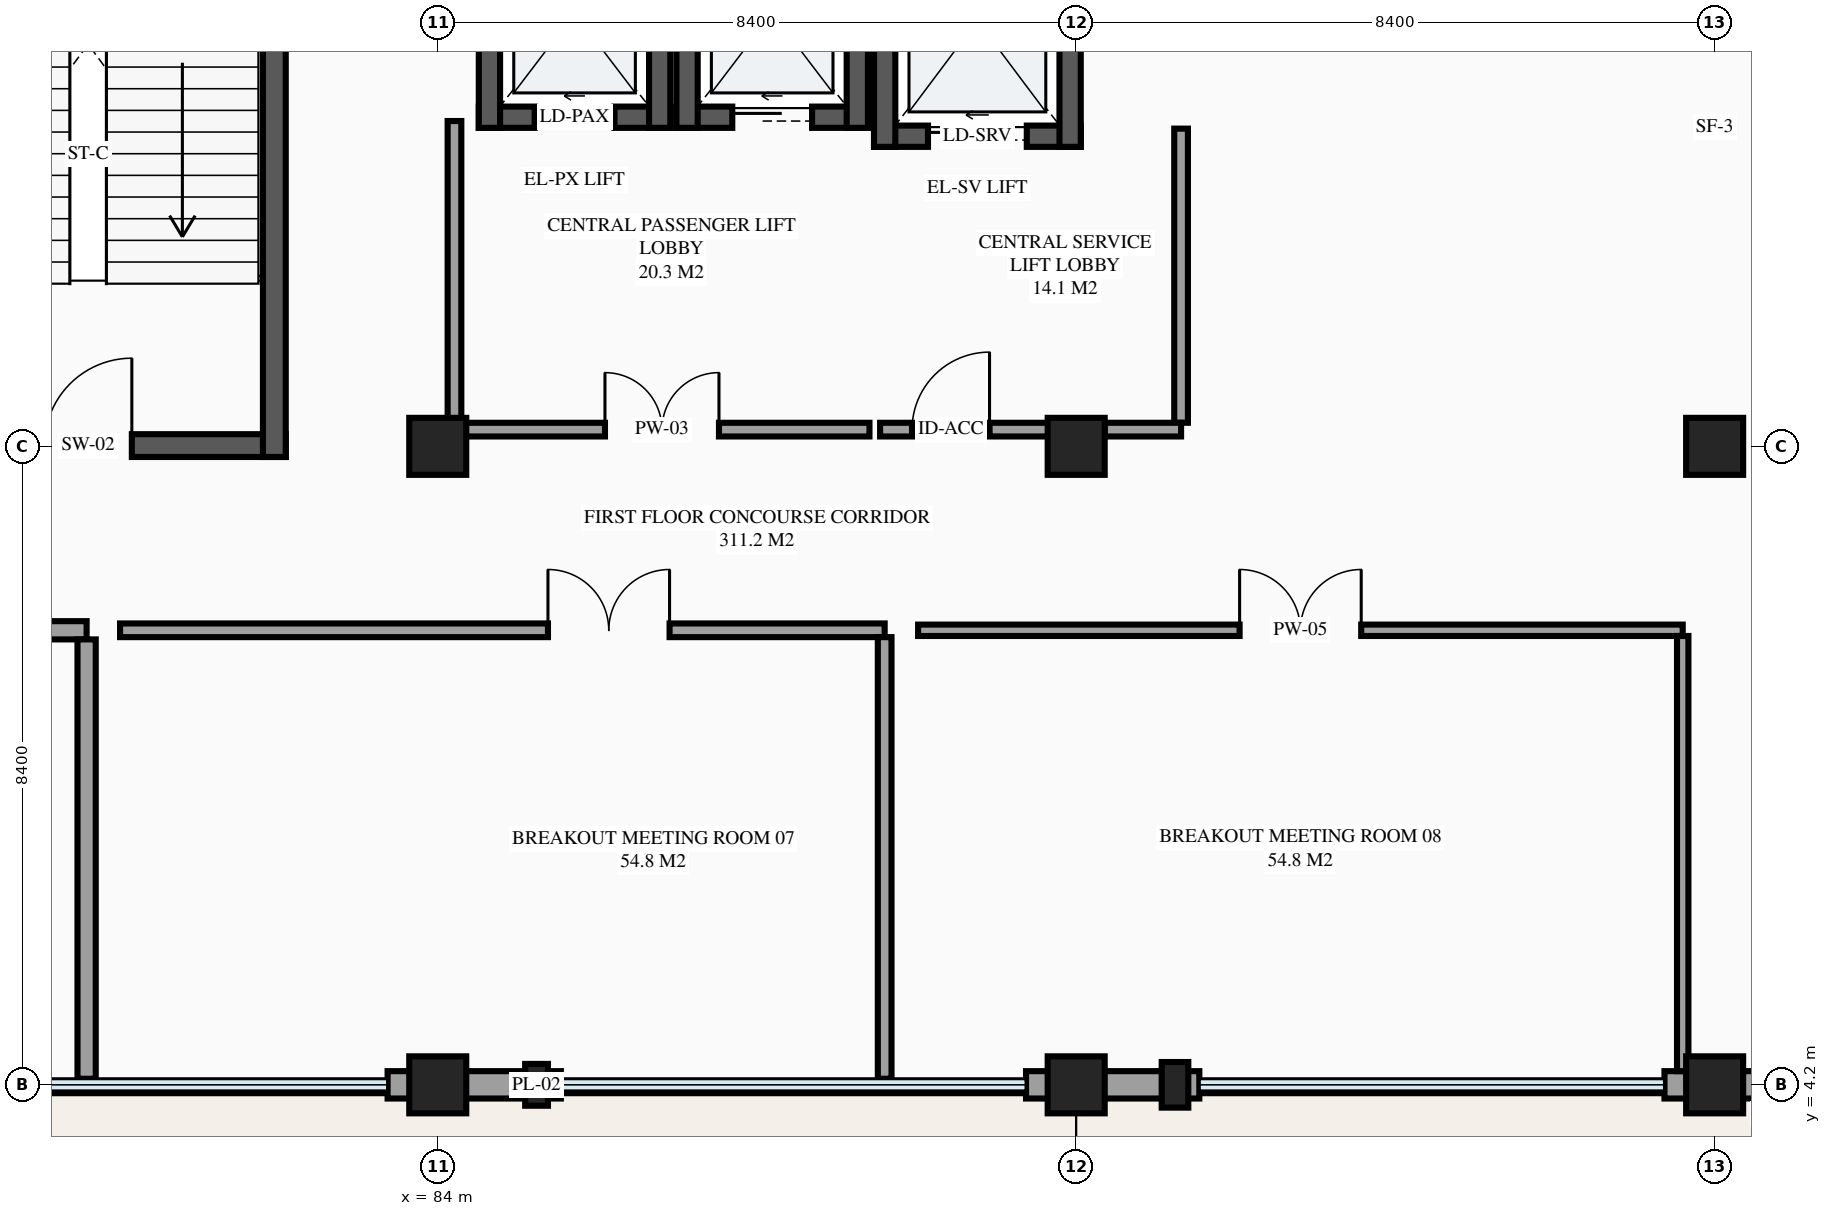
"""IFC4 building model, lengths in metres.
Left out: names, types, materials, properties, quantities, classifications, styles, units other than length and angle.
Written with IfcOpenShell. Run it as: python <this file> out.ifc"""

import sys

from ifc_helpers import new_model, si_unit, direction, frame, frame_2d, origin, origin_2d, place, context, subcontext, project, spatial, rectangle, extrude, element, fill, save


model = new_model("IFC4")
c1 = context("Model", 3, precision=1e-05, world=origin(), true_north=direction((0.0, 1.0)))
c2 = subcontext(c1, "Body", "Model", "MODEL_VIEW")
j1 = project(units=[si_unit("LENGTHUNIT", "METRE"), si_unit("PLANEANGLEUNIT", "RADIAN")], contexts=[c1])
p1 = place(None, origin())
s1 = spatial("IfcSite", under=j1, at=p1, CompositionType="ELEMENT")
p2 = place(p1, origin())
s2 = spatial("IfcBuilding", under=s1, at=p2, CompositionType="ELEMENT")
p3 = place(p2, frame((0.0, 0.0, 5.4)))
s3 = spatial("IfcBuildingStorey", under=s2, at=p3, CompositionType="ELEMENT", Elevation=5.4)
for number, where, z_axis, x_axis in (
    (1, (84.0, 4.2, 0.0), (0.0, 0.0, 1.0), (1.0, 0.0, 0.0)),
    (2, (84.0, 12.6, 0.0), (0.0, 0.0, 1.0), (1.0, 0.0, 0.0)),
    (3, (92.4, 4.2, 0.0), (0.0, 0.0, 1.0), (1.0, 0.0, 0.0)),
    (4, (92.4, 12.6, 0.0), (0.0, 0.0, 1.0), (1.0, 0.0, 0.0)),
    (5, (100.8, 4.2, 0.0), (0.0, 0.0, 1.0), (1.0, 0.0, 0.0)),
    (6, (100.8, 12.6, 0.0), (0.0, 0.0, 1.0), (1.0, 0.0, 0.0)),
):
    element("IfcColumn", number, at=place(p3, frame(where, z_axis=z_axis, x_axis=x_axis)), inside=s3, PredefinedType="COLUMN", context=c2, shape_type="SweptSolid", body=[
        extrude(rectangle(XDim=0.75, YDim=0.75, at=origin_2d()), origin(), (0.0, 0.0, 1.0), 4.5),
    ])
p4 = place(p3, frame((85.3, 4.2, 0.0), z_axis=(0.0, 0.0, 1.0), x_axis=(1.0, 0.0, 0.0)))
e7 = element("IfcColumn", 7, at=p4, inside=s3, PredefinedType="PILASTER", context=c2, shape_type="SweptSolid", body=[
    extrude(rectangle(XDim=0.3, YDim=0.55, at=origin_2d()), origin(), (0.0, 0.0, 1.0), 4.5),
])
p5 = place(p3, frame((93.7, 4.2, 0.0), z_axis=(0.0, 0.0, 1.0), x_axis=(1.0, 0.0, 0.0)))
e8 = element("IfcColumn", 8, at=p5, inside=s3, PredefinedType="PILASTER", context=c2, shape_type="SweptSolid", body=[
    extrude(rectangle(XDim=0.35, YDim=0.6, at=origin_2d()), origin(), (0.0, 0.0, 1.0), 4.5),
])
p6 = place(p3, frame((83.34, 4.2, 0.0), z_axis=(0.0, 0.0, 1.0), x_axis=(1.0, 0.0, 0.0)))
e9 = element("IfcWall", 9, at=p6, inside=s3, PredefinedType="STANDARD", context=c2, shape_type="SweptSolid", body=[
    extrude(rectangle(XDim=0.66, YDim=0.36, at=frame_2d((0.33, 0.0))), origin(), (0.0, 0.0, 1.0), 4.5),
])
p7 = place(p3, frame((84.0, 4.2, 0.0), z_axis=(0.0, 0.0, 1.0), x_axis=(1.0, 0.0, 0.0)))
e10 = element("IfcWall", 10, at=p7, inside=s3, PredefinedType="STANDARD", context=c2, shape_type="SweptSolid", body=[
    extrude(rectangle(XDim=1.62, YDim=0.36, at=frame_2d((0.81, 0.0))), origin(), (0.0, 0.0, 1.0), 3.93),
])
p8 = place(p3, frame((91.74, 4.2, 0.0), z_axis=(0.0, 0.0, 1.0), x_axis=(1.0, 0.0, 0.0)))
e11 = element("IfcWall", 11, at=p8, inside=s3, PredefinedType="STANDARD", context=c2, shape_type="SweptSolid", body=[
    extrude(rectangle(XDim=0.66, YDim=0.36, at=frame_2d((0.33, 0.0))), origin(), (0.0, 0.0, 1.0), 4.5),
])
p9 = place(p3, frame((92.4, 4.2, 0.0), z_axis=(0.0, 0.0, 1.0), x_axis=(1.0, 0.0, 0.0)))
e12 = element("IfcWall", 12, at=p9, inside=s3, PredefinedType="STANDARD", context=c2, shape_type="SweptSolid", body=[
    extrude(rectangle(XDim=1.62, YDim=0.36, at=frame_2d((0.81, 0.0))), origin(), (0.0, 0.0, 1.0), 3.83),
])
p10 = place(p3, frame((100.14, 4.2, 0.0), z_axis=(0.0, 0.0, 1.0), x_axis=(1.0, 0.0, 0.0)))
e13 = element("IfcWall", 13, at=p10, inside=s3, PredefinedType="STANDARD", context=c2, shape_type="SweptSolid", body=[
    extrude(rectangle(XDim=0.66, YDim=0.36, at=frame_2d((0.33, 0.0))), origin(), (0.0, 0.0, 1.0), 4.5),
])
p11 = place(p3, frame((100.8, 4.2, 0.0), z_axis=(0.0, 0.0, 1.0), x_axis=(1.0, 0.0, 0.0)))
e14 = element("IfcWall", 14, at=p11, inside=s3, PredefinedType="STANDARD", context=c2, shape_type="SweptSolid", body=[
    extrude(rectangle(XDim=8.4, YDim=0.36, at=frame_2d((4.2, 0.0))), origin(), (0.0, 0.0, 1.0), 3.44),
])
p12 = place(p11, frame((3.0, 0.0, 0.75)))
e15 = element("IfcOpeningElement", 15, at=p12, cuts=e14, PredefinedType="OPENING", context=c2, shape_type="SweptSolid", body=[
    extrude(rectangle(XDim=2.4, YDim=1.5, at=frame_2d((1.2, 0.75))), frame((0.0, 0.19, 0.0), z_axis=(0.0, -1.0, 0.0), x_axis=(1.0, 0.0, 0.0)), (0.0, 0.0, 1.0), 0.38),
])
p13 = place(p3, frame((84.54, 16.93, 0.0), z_axis=(0.0, 0.0, 1.0), x_axis=(1.0, 0.0, 0.0)))
e16 = element("IfcWall", 16, at=p13, inside=s3, PredefinedType="SHEAR", context=c2, shape_type="SweptSolid", body=[
    extrude(rectangle(XDim=2.52, YDim=0.28, at=frame_2d((1.26, 0.0))), origin(), (0.0, 0.0, 1.0), 4.5),
])
p14 = place(p13, frame((0.735, 0.0, 0.0)))
e17 = element("IfcOpeningElement", 17, at=p14, cuts=e16, PredefinedType="OPENING", context=c2, shape_type="SweptSolid", body=[
    extrude(rectangle(XDim=1.05, YDim=2.2, at=frame_2d((0.525, 1.1))), frame((0.0, 0.15, 0.0), z_axis=(0.0, -1.0, 0.0), x_axis=(1.0, 0.0, 0.0)), (0.0, 0.0, 1.0), 0.3),
])
for number, where, z_axis, x_axis in (
    (18, (86.92, 16.79, 0.0), (0.0, 0.0, 1.0), (0.0, 1.0, 0.0)),
    (19, (84.68, 19.81, 0.0), (0.0, 0.0, 1.0), (0.0, -1.0, 0.0)),
):
    element("IfcWall", number, at=place(p3, frame(where, z_axis=z_axis, x_axis=x_axis)), inside=s3, PredefinedType="SHEAR", context=c2, shape_type="SweptSolid", body=[
        extrude(rectangle(XDim=3.02, YDim=0.28, at=frame_2d((1.51, 0.0))), origin(), (0.0, 0.0, 1.0), 4.5),
    ])
p15 = place(p3, frame((87.14, 16.93, 0.0), z_axis=(0.0, 0.0, 1.0), x_axis=(1.0, 0.0, 0.0)))
e20 = element("IfcWall", 20, at=p15, inside=s3, PredefinedType="SHEAR", context=c2, shape_type="SweptSolid", body=[
    extrude(rectangle(XDim=2.52, YDim=0.28, at=frame_2d((1.26, 0.0))), origin(), (0.0, 0.0, 1.0), 4.5),
])
p16 = place(p15, frame((0.735, 0.0, 0.0)))
e21 = element("IfcOpeningElement", 21, at=p16, cuts=e20, PredefinedType="OPENING", context=c2, shape_type="SweptSolid", body=[
    extrude(rectangle(XDim=1.05, YDim=2.2, at=frame_2d((0.525, 1.1))), frame((0.0, 0.15, 0.0), z_axis=(0.0, -1.0, 0.0), x_axis=(1.0, 0.0, 0.0)), (0.0, 0.0, 1.0), 0.3),
])
for number, where, z_axis, x_axis in (
    (22, (89.52, 16.79, 0.0), (0.0, 0.0, 1.0), (0.0, 1.0, 0.0)),
    (23, (87.28, 19.81, 0.0), (0.0, 0.0, 1.0), (0.0, -1.0, 0.0)),
):
    element("IfcWall", number, at=place(p3, frame(where, z_axis=z_axis, x_axis=x_axis)), inside=s3, PredefinedType="SHEAR", context=c2, shape_type="SweptSolid", body=[
        extrude(rectangle(XDim=3.02, YDim=0.28, at=frame_2d((1.51, 0.0))), origin(), (0.0, 0.0, 1.0), 4.5),
    ])
p17 = place(p3, frame((89.74, 16.68, 0.0), z_axis=(0.0, 0.0, 1.0), x_axis=(1.0, 0.0, 0.0)))
e24 = element("IfcWall", 24, at=p17, inside=s3, PredefinedType="SHEAR", context=c2, shape_type="SweptSolid", body=[
    extrude(rectangle(XDim=2.72, YDim=0.28, at=frame_2d((1.36, 0.0))), origin(), (0.0, 0.0, 1.0), 4.5),
])
p18 = place(p17, frame((0.71, 0.0, 0.0)))
e25 = element("IfcOpeningElement", 25, at=p18, cuts=e24, PredefinedType="OPENING", context=c2, shape_type="SweptSolid", body=[
    extrude(rectangle(XDim=1.3, YDim=2.25, at=frame_2d((0.65, 1.125))), frame((0.0, 0.15, 0.0), z_axis=(0.0, -1.0, 0.0), x_axis=(1.0, 0.0, 0.0)), (0.0, 0.0, 1.0), 0.3),
])
for number, where, z_axis, x_axis in (
    (26, (92.32, 16.54, 0.0), (0.0, 0.0, 1.0), (0.0, 1.0, 0.0)),
    (27, (89.88, 19.86, 0.0), (0.0, 0.0, 1.0), (0.0, -1.0, 0.0)),
):
    element("IfcWall", number, at=place(p3, frame(where, z_axis=z_axis, x_axis=x_axis)), inside=s3, PredefinedType="SHEAR", context=c2, shape_type="SweptSolid", body=[
        extrude(rectangle(XDim=3.32, YDim=0.28, at=frame_2d((1.66, 0.0))), origin(), (0.0, 0.0, 1.0), 4.5),
    ])
p19 = place(p3, frame((76.8, 12.61, 0.0), z_axis=(0.0, 0.0, 1.0), x_axis=(1.0, 0.0, 0.0)))
e28 = element("IfcWall", 28, at=p19, inside=s3, PredefinedType="SHEAR", context=c2, shape_type="SweptSolid", body=[
    extrude(rectangle(XDim=5.2, YDim=0.3, at=frame_2d((2.6, 0.0))), origin(), (0.0, 0.0, 1.0), 4.5),
])
p20 = place(p19, frame((2.025, 0.0, 0.0)))
e29 = element("IfcOpeningElement", 29, at=p20, cuts=e28, PredefinedType="OPENING", context=c2, shape_type="SweptSolid", body=[
    extrude(rectangle(XDim=1.15, YDim=2.15, at=frame_2d((0.575, 1.075))), frame((0.0, 0.16, 0.0), z_axis=(0.0, -1.0, 0.0), x_axis=(1.0, 0.0, 0.0)), (0.0, 0.0, 1.0), 0.32),
])
p21 = place(p3, frame((81.85, 12.46, 0.0), z_axis=(0.0, 0.0, 1.0), x_axis=(0.0, 1.0, 0.0)))
e30 = element("IfcWall", 30, at=p21, inside=s3, PredefinedType="SHEAR", context=c2, shape_type="SweptSolid", body=[
    extrude(rectangle(XDim=8.84, YDim=0.3, at=frame_2d((4.42, 0.0))), origin(), (0.0, 0.0, 1.0), 4.5),
])
p22 = place(p3, frame((84.22, 12.82, 0.0), z_axis=(0.0, 0.0, 1.0), x_axis=(1.0, 0.0, 0.0)))
e31 = element("IfcWall", 31, at=p22, inside=s3, PredefinedType="PARTITIONING", context=c2, shape_type="SweptSolid", body=[
    extrude(rectangle(XDim=5.46, YDim=0.18, at=frame_2d((2.73, 0.0))), origin(), (0.0, 0.0, 1.0), 4.235),
])
p23 = place(p22, frame((1.98, 0.0, 0.0)))
e32 = element("IfcOpeningElement", 32, at=p23, cuts=e31, PredefinedType="OPENING", context=c2, shape_type="SweptSolid", body=[
    extrude(rectangle(XDim=1.5, YDim=2.15, at=frame_2d((0.75, 1.075))), frame((0.0, 0.1, 0.0), z_axis=(0.0, -1.0, 0.0), x_axis=(1.0, 0.0, 0.0)), (0.0, 0.0, 1.0), 0.2),
])
p24 = place(p3, frame((84.22, 12.91, 0.0), z_axis=(0.0, 0.0, 1.0), x_axis=(0.0, 1.0, 0.0)))
e33 = element("IfcWall", 33, at=p24, inside=s3, PredefinedType="PARTITIONING", context=c2, shape_type="SweptSolid", body=[
    extrude(rectangle(XDim=3.97, YDim=0.18, at=frame_2d((1.985, 0.0))), origin(), (0.0, 0.0, 1.0), 4.235),
])
p25 = place(p3, frame((89.82, 12.82, 0.0), z_axis=(0.0, 0.0, 1.0), x_axis=(1.0, 0.0, 0.0)))
e34 = element("IfcWall", 34, at=p25, inside=s3, PredefinedType="PARTITIONING", context=c2, shape_type="SweptSolid", body=[
    extrude(rectangle(XDim=2.955, YDim=0.18, at=frame_2d((1.478, 0.0))), origin(), (0.0, 0.0, 1.0), 4.235),
])
p26 = place(p25, frame((0.42, 0.0, 0.0)))
e35 = element("IfcOpeningElement", 35, at=p26, cuts=e34, PredefinedType="OPENING", context=c2, shape_type="SweptSolid", body=[
    extrude(rectangle(XDim=1.02, YDim=2.15, at=frame_2d((0.51, 1.075))), frame((0.0, 0.1, 0.0), z_axis=(0.0, -1.0, 0.0), x_axis=(1.0, 0.0, 0.0)), (0.0, 0.0, 1.0), 0.2),
])
p27 = place(p3, frame((93.78, 12.91, 0.0), z_axis=(0.0, 0.0, 1.0), x_axis=(0.0, 1.0, 0.0)))
e36 = element("IfcWall", 36, at=p27, inside=s3, PredefinedType="PARTITIONING", context=c2, shape_type="SweptSolid", body=[
    extrude(rectangle(XDim=3.87, YDim=0.18, at=frame_2d((1.935, 0.0))), origin(), (0.0, 0.0, 1.0), 4.235),
])
p28 = place(p3, frame((69.32, 10.18, 0.0), z_axis=(0.0, 0.0, 1.0), x_axis=(1.0, 0.0, 0.0)))
e37 = element("IfcWall", 37, at=p28, inside=s3, PredefinedType="PARTITIONING", context=c2, shape_type="SweptSolid", body=[
    extrude(rectangle(XDim=10.06, YDim=0.24, at=frame_2d((5.03, 0.0))), origin(), (0.0, 0.0, 1.0), 4.235),
])
p29 = place(p28, frame((3.18, 0.0, 0.0)))
e38 = element("IfcOpeningElement", 38, at=p29, cuts=e37, PredefinedType="OPENING", context=c2, shape_type="SweptSolid", body=[
    extrude(rectangle(XDim=1.6, YDim=2.25, at=frame_2d((0.8, 1.125))), frame((0.0, 0.13, 0.0), z_axis=(0.0, -1.0, 0.0), x_axis=(1.0, 0.0, 0.0)), (0.0, 0.0, 1.0), 0.26),
])
p30 = place(p3, frame((79.38, 4.28, 0.0), z_axis=(0.0, 0.0, 1.0), x_axis=(0.0, 1.0, 0.0)))
e39 = element("IfcWall", 39, at=p30, inside=s3, PredefinedType="PARTITIONING", context=c2, shape_type="SweptSolid", body=[
    extrude(rectangle(XDim=5.78, YDim=0.24, at=frame_2d((2.89, 0.0))), origin(), (0.0, 0.0, 1.0), 4.235),
])
p31 = place(p3, frame((79.82, 10.18, 0.0), z_axis=(0.0, 0.0, 1.0), x_axis=(1.0, 0.0, 0.0)))
e40 = element("IfcWall", 40, at=p31, inside=s3, PredefinedType="PARTITIONING", context=c2, shape_type="SweptSolid", body=[
    extrude(rectangle(XDim=10.06, YDim=0.18, at=frame_2d((5.03, 0.0))), origin(), (0.0, 0.0, 1.0), 4.235),
])
p32 = place(p31, frame((5.63, 0.0, 0.0)))
e41 = element("IfcOpeningElement", 41, at=p32, cuts=e40, PredefinedType="OPENING", context=c2, shape_type="SweptSolid", body=[
    extrude(rectangle(XDim=1.6, YDim=2.25, at=frame_2d((0.8, 1.125))), frame((0.0, 0.1, 0.0), z_axis=(0.0, -1.0, 0.0), x_axis=(1.0, 0.0, 0.0)), (0.0, 0.0, 1.0), 0.2),
])
p33 = place(p3, frame((89.88, 4.28, 0.0), z_axis=(0.0, 0.0, 1.0), x_axis=(0.0, 1.0, 0.0)))
e42 = element("IfcWall", 42, at=p33, inside=s3, PredefinedType="PARTITIONING", context=c2, shape_type="SweptSolid", body=[
    extrude(rectangle(XDim=5.81, YDim=0.18, at=frame_2d((2.905, 0.0))), origin(), (0.0, 0.0, 1.0), 4.235),
])
p34 = place(p3, frame((90.32, 10.18, 0.0), z_axis=(0.0, 0.0, 1.0), x_axis=(1.0, 0.0, 0.0)))
e43 = element("IfcWall", 43, at=p34, inside=s3, PredefinedType="PARTITIONING", context=c2, shape_type="SweptSolid", body=[
    extrude(rectangle(XDim=10.06, YDim=0.15, at=frame_2d((5.03, 0.0))), origin(), (0.0, 0.0, 1.0), 4.235),
])
p35 = place(p34, frame((4.23, 0.0, 0.0)))
e44 = element("IfcOpeningElement", 44, at=p35, cuts=e43, PredefinedType="OPENING", context=c2, shape_type="SweptSolid", body=[
    extrude(rectangle(XDim=1.6, YDim=2.25, at=frame_2d((0.8, 1.125))), frame((0.0, 0.085, 0.0), z_axis=(0.0, -1.0, 0.0), x_axis=(1.0, 0.0, 0.0)), (0.0, 0.0, 1.0), 0.17),
])
p36 = place(p3, frame((100.38, 4.38, 0.0), z_axis=(0.0, 0.0, 1.0), x_axis=(0.0, 1.0, 0.0)))
e45 = element("IfcWall", 45, at=p36, inside=s3, PredefinedType="PARTITIONING", context=c2, shape_type="SweptSolid", body=[
    extrude(rectangle(XDim=5.725, YDim=0.15, at=frame_2d((2.863, 0.0))), origin(), (0.0, 0.0, 1.0), 4.235),
])
p37 = place(p3, frame((92.775, 12.82, 0.0), z_axis=(0.0, 0.0, 1.0), x_axis=(1.0, 0.0, 0.0)))
e46 = element("IfcWall", 46, at=p37, inside=s3, PredefinedType="PARTITIONING", context=c2, shape_type="SweptSolid", body=[
    extrude(rectangle(XDim=1.005, YDim=0.18, at=frame_2d((0.502, 0.0))), origin(), (0.0, 0.0, 1.0), 3.49),
])
p38 = place(p14, origin())
e47 = element("IfcDoor", 47, at=p38, inside=s3, OperationType="SLIDING_TO_LEFT", PredefinedType="DOOR", context=c2, shape_type="SweptSolid", body=[
    extrude(rectangle(XDim=1.05, YDim=2.2, at=frame_2d((0.525, 1.1))), frame((0.0, 0.025, 0.0), z_axis=(0.0, -1.0, 0.0), x_axis=(1.0, 0.0, 0.0)), (0.0, 0.0, 1.0), 0.05),
])
fill(e17, e47)
p39 = place(p16, origin())
e48 = element("IfcDoor", 48, at=p39, inside=s3, OperationType="SLIDING_TO_LEFT", PredefinedType="DOOR", context=c2, shape_type="SweptSolid", body=[
    extrude(rectangle(XDim=1.05, YDim=2.2, at=frame_2d((0.525, 1.1))), frame((0.0, 0.025, 0.0), z_axis=(0.0, -1.0, 0.0), x_axis=(1.0, 0.0, 0.0)), (0.0, 0.0, 1.0), 0.05),
])
fill(e21, e48)
p40 = place(p18, origin())
e49 = element("IfcDoor", 49, at=p40, inside=s3, OperationType="SLIDING_TO_LEFT", PredefinedType="DOOR", context=c2, shape_type="SweptSolid", body=[
    extrude(rectangle(XDim=1.3, YDim=2.25, at=frame_2d((0.65, 1.125))), frame((0.0, 0.025, 0.0), z_axis=(0.0, -1.0, 0.0), x_axis=(1.0, 0.0, 0.0)), (0.0, 0.0, 1.0), 0.05),
])
fill(e25, e49)
p41 = place(p20, origin())
e50 = element("IfcDoor", 50, at=p41, inside=s3, OperationType="SINGLE_SWING_RIGHT", PredefinedType="DOOR", context=c2, shape_type="SweptSolid", body=[
    extrude(rectangle(XDim=1.15, YDim=2.15, at=frame_2d((0.575, 1.075))), frame((0.0, 0.025, 0.0), z_axis=(0.0, -1.0, 0.0), x_axis=(1.0, 0.0, 0.0)), (0.0, 0.0, 1.0), 0.05),
])
fill(e29, e50)
p42 = place(p23, origin())
e51 = element("IfcDoor", 51, at=p42, inside=s3, OperationType="DOUBLE_DOOR_SINGLE_SWING", PredefinedType="DOOR", context=c2, shape_type="SweptSolid", body=[
    extrude(rectangle(XDim=1.5, YDim=2.15, at=frame_2d((0.75, 1.075))), frame((0.0, 0.025, 0.0), z_axis=(0.0, -1.0, 0.0), x_axis=(1.0, 0.0, 0.0)), (0.0, 0.0, 1.0), 0.05),
])
fill(e32, e51)
p43 = place(p26, origin())
e52 = element("IfcDoor", 52, at=p43, inside=s3, OperationType="SINGLE_SWING_RIGHT", PredefinedType="DOOR", context=c2, shape_type="SweptSolid", body=[
    extrude(rectangle(XDim=1.02, YDim=2.15, at=frame_2d((0.51, 1.075))), frame((0.0, 0.025, 0.0), z_axis=(0.0, -1.0, 0.0), x_axis=(1.0, 0.0, 0.0)), (0.0, 0.0, 1.0), 0.05),
])
fill(e35, e52)
p44 = place(p32, origin())
e53 = element("IfcDoor", 53, at=p44, inside=s3, OperationType="DOUBLE_DOOR_SINGLE_SWING", PredefinedType="DOOR", context=c2, shape_type="SweptSolid", body=[
    extrude(rectangle(XDim=1.6, YDim=2.25, at=frame_2d((0.8, 1.125))), frame((0.0, 0.025, 0.0), z_axis=(0.0, -1.0, 0.0), x_axis=(1.0, 0.0, 0.0)), (0.0, 0.0, 1.0), 0.05),
])
fill(e41, e53)
p45 = place(p35, origin())
e54 = element("IfcDoor", 54, at=p45, inside=s3, OperationType="DOUBLE_DOOR_SINGLE_SWING", PredefinedType="DOOR", context=c2, shape_type="SweptSolid", body=[
    extrude(rectangle(XDim=1.6, YDim=2.25, at=frame_2d((0.8, 1.125))), frame((0.0, 0.025, 0.0), z_axis=(0.0, -1.0, 0.0), x_axis=(1.0, 0.0, 0.0)), (0.0, 0.0, 1.0), 0.05),
])
fill(e44, e54)
save(model, sys.argv[1])
